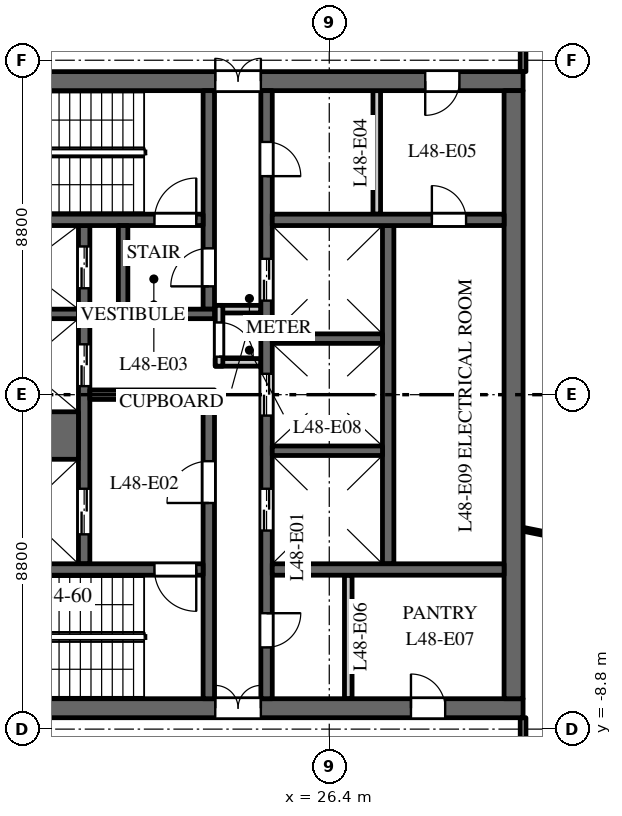
"""IFC4 building model, lengths in metres.
Left out: names, types, materials, properties, quantities, classifications, styles, units other than length and angle.
Written with IfcOpenShell. Run it as: python <this file> out.ifc"""

import sys

from ifc_helpers import new_model, si_unit, direction, frame, frame_2d, origin, place, context, subcontext, project, spatial, rectangle, extrude, element, fill, save


model = new_model("IFC4")
c1 = context("Model", 3, precision=1e-05, world=origin(), true_north=direction((0.0, 1.0)))
c2 = subcontext(c1, "Body", "Model", "MODEL_VIEW")
j1 = project(units=[si_unit("LENGTHUNIT", "METRE"), si_unit("PLANEANGLEUNIT", "RADIAN")], contexts=[c1])
p1 = place(None, origin())
s1 = spatial("IfcSite", under=j1, at=p1, CompositionType="ELEMENT")
p2 = place(p1, origin())
s2 = spatial("IfcBuilding", under=s1, at=p2, CompositionType="ELEMENT")
p3 = place(p2, frame((0.0, 0.0, 233.5)))
s3 = spatial("IfcBuildingStorey", under=s2, at=p3, CompositionType="ELEMENT", Elevation=233.5)
p4 = place(p3, frame((16.5, 8.25, 0.0), z_axis=(0.0, 0.0, 1.0), x_axis=(1.0, 0.0, 0.0)))
e1 = element("IfcWall", 1, at=p4, inside=s3, PredefinedType="SHEAR", context=c2, shape_type="SweptSolid", body=[
    extrude(rectangle(XDim=15.0, YDim=0.5, at=frame_2d((7.5, 0.0))), origin(), (0.0, 0.0, 1.0), 3.7),
])
p5 = place(p4, frame((6.9, 0.0, 0.0)))
e2 = element("IfcOpeningElement", 2, at=p5, cuts=e1, PredefinedType="OPENING", context=c2, shape_type="SweptSolid", body=[
    extrude(rectangle(XDim=1.2, YDim=2.1, at=frame_2d((0.6, 1.05))), frame((0.0, 0.26, 0.0), z_axis=(0.0, -1.0, 0.0), x_axis=(1.0, 0.0, 0.0)), (0.0, 0.0, 1.0), 0.52),
])
p6 = place(p4, frame((12.425, 0.0, 0.0)))
e3 = element("IfcOpeningElement", 3, at=p6, cuts=e1, PredefinedType="OPENING", context=c2, shape_type="SweptSolid", body=[
    extrude(rectangle(XDim=0.9, YDim=2.1, at=frame_2d((0.45, 1.05))), frame((0.0, 0.26, 0.0), z_axis=(0.0, -1.0, 0.0), x_axis=(1.0, 0.0, 0.0)), (0.0, 0.0, 1.0), 0.52),
])
p7 = place(p3, frame((16.5, -8.25, 0.0), z_axis=(0.0, 0.0, 1.0), x_axis=(1.0, 0.0, 0.0)))
e4 = element("IfcWall", 4, at=p7, inside=s3, PredefinedType="SHEAR", context=c2, shape_type="SweptSolid", body=[
    extrude(rectangle(XDim=15.0, YDim=0.5, at=frame_2d((7.5, 0.0))), origin(), (0.0, 0.0, 1.0), 3.7),
])
p8 = place(p7, frame((6.9, 0.0, 0.0)))
e5 = element("IfcOpeningElement", 5, at=p8, cuts=e4, PredefinedType="OPENING", context=c2, shape_type="SweptSolid", body=[
    extrude(rectangle(XDim=1.2, YDim=2.1, at=frame_2d((0.6, 1.05))), frame((0.0, 0.26, 0.0), z_axis=(0.0, -1.0, 0.0), x_axis=(1.0, 0.0, 0.0)), (0.0, 0.0, 1.0), 0.52),
])
p9 = place(p7, frame((12.05, 0.0, 0.0)))
e6 = element("IfcOpeningElement", 6, at=p9, cuts=e4, PredefinedType="OPENING", context=c2, shape_type="SweptSolid", body=[
    extrude(rectangle(XDim=0.9, YDim=2.1, at=frame_2d((0.45, 1.05))), frame((0.0, 0.26, 0.0), z_axis=(0.0, -1.0, 0.0), x_axis=(1.0, 0.0, 0.0)), (0.0, 0.0, 1.0), 0.52),
])
p10 = place(p3, frame((27.95, -4.45, 0.0), z_axis=(0.0, 0.0, 1.0), x_axis=(0.0, 1.0, 0.0)))
e7 = element("IfcWall", 7, at=p10, inside=s3, PredefinedType="SHEAR", context=c2, shape_type="SweptSolid", body=[
    extrude(rectangle(XDim=8.9, YDim=0.3, at=frame_2d((4.45, 0.0))), origin(), (0.0, 0.0, 1.0), 3.7),
])
p11 = place(p3, frame((19.95, -4.45, 0.0), z_axis=(0.0, 0.0, 1.0), x_axis=(0.0, 1.0, 0.0)))
e8 = element("IfcWall", 8, at=p11, inside=s3, PredefinedType="SHEAR", context=c2, shape_type="SweptSolid", body=[
    extrude(rectangle(XDim=8.9, YDim=0.3, at=frame_2d((4.45, 0.0))), origin(), (0.0, 0.0, 1.0), 3.7),
])
p12 = place(p11, frame((0.775, 0.0, 0.0)))
e9 = element("IfcOpeningElement", 9, at=p12, cuts=e8, PredefinedType="OPENING", context=c2, shape_type="SweptSolid", body=[
    extrude(rectangle(XDim=1.2, YDim=2.1, at=frame_2d((0.6, 1.05))), frame((0.0, 0.16, 0.0), z_axis=(0.0, -1.0, 0.0), x_axis=(1.0, 0.0, 0.0)), (0.0, 0.0, 1.0), 0.32),
])
p13 = place(p11, frame((4.675, 0.0, 0.0)))
e10 = element("IfcOpeningElement", 10, at=p13, cuts=e8, PredefinedType="OPENING", context=c2, shape_type="SweptSolid", body=[
    extrude(rectangle(XDim=1.1, YDim=2.1, at=frame_2d((0.55, 1.05))), frame((0.0, 0.16, 0.0), z_axis=(0.0, -1.0, 0.0), x_axis=(1.0, 0.0, 0.0)), (0.0, 0.0, 1.0), 0.32),
])
p14 = place(p11, frame((7.25, 0.0, 0.0)))
e11 = element("IfcOpeningElement", 11, at=p14, cuts=e8, PredefinedType="OPENING", context=c2, shape_type="SweptSolid", body=[
    extrude(rectangle(XDim=1.1, YDim=2.1, at=frame_2d((0.55, 1.05))), frame((0.0, 0.16, 0.0), z_axis=(0.0, -1.0, 0.0), x_axis=(1.0, 0.0, 0.0)), (0.0, 0.0, 1.0), 0.32),
])
p15 = place(p3, frame((24.75, -8.0, 0.0), z_axis=(0.0, 0.0, 1.0), x_axis=(0.0, 1.0, 0.0)))
e12 = element("IfcWall", 12, at=p15, inside=s3, PredefinedType="SHEAR", context=c2, shape_type="SweptSolid", body=[
    extrude(rectangle(XDim=16.0, YDim=0.3, at=frame_2d((8.0, 0.0))), origin(), (0.0, 0.0, 1.0), 3.7),
])
p16 = place(p15, frame((4.425, 0.0, 0.0)))
e13 = element("IfcOpeningElement", 13, at=p16, cuts=e12, PredefinedType="OPENING", context=c2, shape_type="SweptSolid", body=[
    extrude(rectangle(XDim=1.1, YDim=2.1, at=frame_2d((0.55, 1.05))), frame((0.0, 0.16, 0.0), z_axis=(0.0, -1.0, 0.0), x_axis=(1.0, 0.0, 0.0)), (0.0, 0.0, 1.0), 0.32),
])
p17 = place(p15, frame((7.45, 0.0, 0.0)))
e14 = element("IfcOpeningElement", 14, at=p17, cuts=e12, PredefinedType="OPENING", context=c2, shape_type="SweptSolid", body=[
    extrude(rectangle(XDim=1.1, YDim=2.1, at=frame_2d((0.55, 1.05))), frame((0.0, 0.16, 0.0), z_axis=(0.0, -1.0, 0.0), x_axis=(1.0, 0.0, 0.0)), (0.0, 0.0, 1.0), 0.32),
])
p18 = place(p15, frame((10.475, 0.0, 0.0)))
e15 = element("IfcOpeningElement", 15, at=p18, cuts=e12, PredefinedType="OPENING", context=c2, shape_type="SweptSolid", body=[
    extrude(rectangle(XDim=1.1, YDim=2.1, at=frame_2d((0.55, 1.05))), frame((0.0, 0.16, 0.0), z_axis=(0.0, -1.0, 0.0), x_axis=(1.0, 0.0, 0.0)), (0.0, 0.0, 1.0), 0.32),
])
p19 = place(p15, frame((13.75, 0.0, 0.0)))
e16 = element("IfcOpeningElement", 16, at=p19, cuts=e12, PredefinedType="OPENING", context=c2, shape_type="SweptSolid", body=[
    extrude(rectangle(XDim=0.9, YDim=2.1, at=frame_2d((0.45, 1.05))), frame((0.0, 0.16, 0.0), z_axis=(0.0, -1.0, 0.0), x_axis=(1.0, 0.0, 0.0)), (0.0, 0.0, 1.0), 0.32),
])
p20 = place(p15, frame((1.35, 0.0, 0.0)))
e17 = element("IfcOpeningElement", 17, at=p20, cuts=e12, PredefinedType="OPENING", context=c2, shape_type="SweptSolid", body=[
    extrude(rectangle(XDim=0.9, YDim=2.1, at=frame_2d((0.45, 1.05))), frame((0.0, 0.16, 0.0), z_axis=(0.0, -1.0, 0.0), x_axis=(1.0, 0.0, 0.0)), (0.0, 0.0, 1.0), 0.32),
])
p21 = place(p3, frame((20.1, 0.0, 0.0), z_axis=(0.0, 0.0, 1.0), x_axis=(1.0, 0.0, 0.0)))
e18 = element("IfcWall", 18, at=p21, inside=s3, PredefinedType="SHEAR", context=c2, shape_type="SweptSolid", body=[
    extrude(rectangle(XDim=3.28, YDim=0.25, at=frame_2d((1.64, 0.0))), origin(), (0.0, 0.0, 1.0), 3.7),
])
for number, where, z_axis, x_axis in (
    (19, (23.4, 0.85, 0.0), (0.0, 0.0, 1.0), (1.0, 0.0, 0.0)),
    (20, (23.4, 2.25, 0.0), (0.0, 0.0, 1.0), (1.0, 0.0, 0.0)),
):
    element("IfcWall", number, at=place(p3, frame(where, z_axis=z_axis, x_axis=x_axis)), inside=s3, PredefinedType="PARTITIONING", context=c2, shape_type="SweptSolid", body=[
        extrude(rectangle(XDim=1.2, YDim=0.2, at=frame_2d((0.6, 0.0))), origin(), (0.0, 0.0, 1.0), 3.7),
    ])
p22 = place(p3, frame((23.5, 0.75, 0.0), z_axis=(0.0, 0.0, 1.0), x_axis=(0.0, 1.0, 0.0)))
e21 = element("IfcWall", 21, at=p22, inside=s3, PredefinedType="PARTITIONING", context=c2, shape_type="SweptSolid", body=[
    extrude(rectangle(XDim=1.6, YDim=0.2, at=frame_2d((0.8, 0.0))), origin(), (0.0, 0.0, 1.0), 3.7),
])
p23 = place(p22, frame((0.25, 0.0, 0.0)))
e22 = element("IfcOpeningElement", 22, at=p23, cuts=e21, PredefinedType="OPENING", context=c2, shape_type="SweptSolid", body=[
    extrude(rectangle(XDim=0.9, YDim=2.1, at=frame_2d((0.45, 1.05))), frame((0.0, 0.11, 0.0), z_axis=(0.0, -1.0, 0.0), x_axis=(1.0, 0.0, 0.0)), (0.0, 0.0, 1.0), 0.22),
])
p24 = place(p3, frame((31.25, -8.0, 0.0), z_axis=(0.0, 0.0, 1.0), x_axis=(0.0, 1.0, 0.0)))
e23 = element("IfcWall", 23, at=p24, inside=s3, PredefinedType="SHEAR", context=c2, shape_type="SweptSolid", body=[
    extrude(rectangle(XDim=16.0, YDim=0.5, at=frame_2d((8.0, 0.0))), origin(), (0.0, 0.0, 1.0), 3.7),
])
p25 = place(p3, frame((24.9, 4.6, 0.0), z_axis=(0.0, 0.0, 1.0), x_axis=(1.0, 0.0, 0.0)))
e24 = element("IfcWall", 24, at=p25, inside=s3, PredefinedType="SHEAR", context=c2, shape_type="SweptSolid", body=[
    extrude(rectangle(XDim=6.1, YDim=0.3, at=frame_2d((3.05, 0.0))), origin(), (0.0, 0.0, 1.0), 3.7),
])
p26 = place(p25, frame((4.2, 0.0, 0.0)))
e25 = element("IfcOpeningElement", 25, at=p26, cuts=e24, PredefinedType="OPENING", context=c2, shape_type="SweptSolid", body=[
    extrude(rectangle(XDim=0.9, YDim=2.1, at=frame_2d((0.45, 1.05))), frame((0.0, 0.16, 0.0), z_axis=(0.0, -1.0, 0.0), x_axis=(1.0, 0.0, 0.0)), (0.0, 0.0, 1.0), 0.32),
])
for number, where, z_axis, x_axis in (
    (26, (27.65, 4.75, 0.0), (0.0, 0.0, 1.0), (0.0, 1.0, 0.0)),
    (27, (26.9, -8.0, 0.0), (0.0, 0.0, 1.0), (0.0, 1.0, 0.0)),
):
    element("IfcWall", number, at=place(p3, frame(where, z_axis=z_axis, x_axis=x_axis)), inside=s3, PredefinedType="PARTITIONING", context=c2, shape_type="SweptSolid", body=[
        extrude(rectangle(XDim=3.25, YDim=0.2, at=frame_2d((1.625, 0.0))), origin(), (0.0, 0.0, 1.0), 3.7),
    ])
p27 = place(p3, frame((24.9, -4.6, 0.0), z_axis=(0.0, 0.0, 1.0), x_axis=(1.0, 0.0, 0.0)))
e28 = element("IfcWall", 28, at=p27, inside=s3, PredefinedType="SHEAR", context=c2, shape_type="SweptSolid", body=[
    extrude(rectangle(XDim=6.1, YDim=0.3, at=frame_2d((3.05, 0.0))), origin(), (0.0, 0.0, 1.0), 3.7),
])
p28 = place(p3, frame((16.9, -1.075, 0.0), z_axis=(0.0, 0.0, 1.0), x_axis=(1.0, 0.0, 0.0)))
e29 = element("IfcWall", 29, at=p28, inside=s3, PredefinedType="SHEAR", context=c2, shape_type="SweptSolid", body=[
    extrude(rectangle(XDim=2.9, YDim=1.25, at=frame_2d((1.45, 0.0))), origin(), (0.0, 0.0, 1.0), 3.7),
])
for number, where, z_axis, x_axis in (
    (30, (16.9, 2.125, 0.0), (0.0, 0.0, 1.0), (1.0, 0.0, 0.0)),
    (31, (24.9, -1.475, 0.0), (0.0, 0.0, 1.0), (1.0, 0.0, 0.0)),
    (32, (24.9, 1.475, 0.0), (0.0, 0.0, 1.0), (1.0, 0.0, 0.0)),
):
    element("IfcWall", number, at=place(p3, frame(where, z_axis=z_axis, x_axis=x_axis)), inside=s3, PredefinedType="SHEAR", context=c2, shape_type="SweptSolid", body=[
        extrude(rectangle(XDim=2.9, YDim=0.25, at=frame_2d((1.45, 0.0))), origin(), (0.0, 0.0, 1.0), 3.7),
    ])
p29 = place(p3, frame((23.23, 2.25, 0.0), z_axis=(0.0, 0.0, 1.0), x_axis=(0.0, 1.0, 0.0)))
e33 = element("IfcWall", 33, at=p29, inside=s3, PredefinedType="SHEAR", context=c2, shape_type="SweptSolid", body=[
    extrude(rectangle(XDim=5.75, YDim=0.3, at=frame_2d((2.875, 0.0))), origin(), (0.0, 0.0, 1.0), 3.7),
])
p30 = place(p29, frame((0.6, 0.0, 0.0)))
e34 = element("IfcOpeningElement", 34, at=p30, cuts=e33, PredefinedType="OPENING", context=c2, shape_type="SweptSolid", body=[
    extrude(rectangle(XDim=1.0, YDim=2.1, at=frame_2d((0.5, 1.05))), frame((0.0, 0.16, 0.0), z_axis=(0.0, -1.0, 0.0), x_axis=(1.0, 0.0, 0.0)), (0.0, 0.0, 1.0), 0.32),
])
p31 = place(p3, frame((23.23, -8.0, 0.0), z_axis=(0.0, 0.0, 1.0), x_axis=(0.0, 1.0, 0.0)))
e35 = element("IfcWall", 35, at=p31, inside=s3, PredefinedType="SHEAR", context=c2, shape_type="SweptSolid", body=[
    extrude(rectangle(XDim=7.875, YDim=0.3, at=frame_2d((3.938, 0.0))), origin(), (0.0, 0.0, 1.0), 3.7),
])
p32 = place(p31, frame((5.15, 0.0, 0.0)))
e36 = element("IfcOpeningElement", 36, at=p32, cuts=e35, PredefinedType="OPENING", context=c2, shape_type="SweptSolid", body=[
    extrude(rectangle(XDim=1.1, YDim=2.1, at=frame_2d((0.55, 1.05))), frame((0.0, 0.16, 0.0), z_axis=(0.0, -1.0, 0.0), x_axis=(1.0, 0.0, 0.0)), (0.0, 0.0, 1.0), 0.32),
])
p33 = place(p3, frame((16.9, 4.6, 0.0), z_axis=(0.0, 0.0, 1.0), x_axis=(1.0, 0.0, 0.0)))
e37 = element("IfcWall", 37, at=p33, inside=s3, PredefinedType="SHEAR", context=c2, shape_type="SweptSolid", body=[
    extrude(rectangle(XDim=6.18, YDim=0.3, at=frame_2d((3.09, 0.0))), origin(), (0.0, 0.0, 1.0), 3.7),
])
p34 = place(p33, frame((4.9, 0.0, 0.0)))
e38 = element("IfcOpeningElement", 38, at=p34, cuts=e37, PredefinedType="OPENING", context=c2, shape_type="SweptSolid", body=[
    extrude(rectangle(XDim=1.1, YDim=2.1, at=frame_2d((0.55, 1.05))), frame((0.0, 0.16, 0.0), z_axis=(0.0, -1.0, 0.0), x_axis=(1.0, 0.0, 0.0)), (0.0, 0.0, 1.0), 0.32),
])
p35 = place(p3, frame((16.9, -4.6, 0.0), z_axis=(0.0, 0.0, 1.0), x_axis=(1.0, 0.0, 0.0)))
e39 = element("IfcWall", 39, at=p35, inside=s3, PredefinedType="SHEAR", context=c2, shape_type="SweptSolid", body=[
    extrude(rectangle(XDim=6.18, YDim=0.3, at=frame_2d((3.09, 0.0))), origin(), (0.0, 0.0, 1.0), 3.7),
])
p36 = place(p35, frame((4.9, 0.0, 0.0)))
e40 = element("IfcOpeningElement", 40, at=p36, cuts=e39, PredefinedType="OPENING", context=c2, shape_type="SweptSolid", body=[
    extrude(rectangle(XDim=1.1, YDim=2.1, at=frame_2d((0.55, 1.05))), frame((0.0, 0.16, 0.0), z_axis=(0.0, -1.0, 0.0), x_axis=(1.0, 0.0, 0.0)), (0.0, 0.0, 1.0), 0.32),
])
p37 = place(p3, frame((20.85, 2.125, 0.0), z_axis=(0.0, 0.0, 1.0), x_axis=(1.0, 0.0, 0.0)))
e41 = element("IfcWall", 41, at=p37, inside=s3, PredefinedType="SHEAR", context=c2, shape_type="SweptSolid", body=[
    extrude(rectangle(XDim=2.53, YDim=0.25, at=frame_2d((1.265, 0.0))), origin(), (0.0, 0.0, 1.0), 3.7),
])
p38 = place(p3, frame((20.975, 2.25, 0.0), z_axis=(0.0, 0.0, 1.0), x_axis=(0.0, 1.0, 0.0)))
e42 = element("IfcWall", 42, at=p38, inside=s3, PredefinedType="SHEAR", context=c2, shape_type="SweptSolid", body=[
    extrude(rectangle(XDim=2.2, YDim=0.25, at=frame_2d((1.1, 0.0))), origin(), (0.0, 0.0, 1.0), 3.7),
])
p39 = place(p3, frame((31.5, -10.7, 0.0), z_axis=(0.0, 0.0, 1.0), x_axis=(0.0, 1.0, 0.0)))
e43 = element("IfcWall", 43, at=p39, inside=s3, PredefinedType="PARTITIONING", context=c2, shape_type="SweptSolid", body=[
    extrude(rectangle(XDim=2.2, YDim=0.15, at=frame_2d((1.1, 0.0))), origin(), (0.0, 0.0, 1.0), 3.0),
])
p40 = place(p39, frame((0.65, 0.0, 0.0)))
e44 = element("IfcOpeningElement", 44, at=p40, cuts=e43, PredefinedType="OPENING", context=c2, shape_type="SweptSolid", body=[
    extrude(rectangle(XDim=1.0, YDim=2.1, at=frame_2d((0.5, 1.05))), frame((0.0, 0.085, 0.0), z_axis=(0.0, -1.0, 0.0), x_axis=(1.0, 0.0, 0.0)), (0.0, 0.0, 1.0), 0.17),
])
p41 = place(p3, frame((31.5, -3.542, 0.0), z_axis=(0.0, 0.0, 1.0), x_axis=(0.980357474535, -0.197228857227, 0.0)))
e45 = element("IfcWall", 45, at=p41, inside=s3, PredefinedType="PARTITIONING", context=c2, shape_type="SweptSolid", body=[
    extrude(rectangle(XDim=4.092, YDim=0.1, at=frame_2d((2.046, 0.0))), origin(), (0.0, 0.0, 1.0), 3.0),
])
p42 = place(p3, frame((31.5, 8.5, 0.0), z_axis=(0.0, 0.0, 1.0), x_axis=(0.0, 1.0, 0.0)))
e46 = element("IfcWall", 46, at=p42, inside=s3, PredefinedType="PARTITIONING", context=c2, shape_type="SweptSolid", body=[
    extrude(rectangle(XDim=2.2, YDim=0.15, at=frame_2d((1.1, 0.0))), origin(), (0.0, 0.0, 1.0), 3.0),
])
p43 = place(p42, frame((0.65, 0.0, 0.0)))
e47 = element("IfcOpeningElement", 47, at=p43, cuts=e46, PredefinedType="OPENING", context=c2, shape_type="SweptSolid", body=[
    extrude(rectangle(XDim=1.0, YDim=2.1, at=frame_2d((0.5, 1.05))), frame((0.0, 0.085, 0.0), z_axis=(0.0, -1.0, 0.0), x_axis=(1.0, 0.0, 0.0)), (0.0, 0.0, 1.0), 0.17),
])
p44 = place(p12, origin())
e48 = element("IfcDoor", 48, at=p44, inside=s3, OperationType="DOUBLE_DOOR_SLIDING", PredefinedType="DOOR", context=c2, shape_type="SweptSolid", body=[
    extrude(rectangle(XDim=1.2, YDim=2.1, at=frame_2d((0.6, 1.05))), frame((0.0, 0.025, 0.0), z_axis=(0.0, -1.0, 0.0), x_axis=(1.0, 0.0, 0.0)), (0.0, 0.0, 1.0), 0.05),
])
fill(e9, e48)
p45 = place(p13, origin())
e49 = element("IfcDoor", 49, at=p45, inside=s3, OperationType="DOUBLE_DOOR_SLIDING", PredefinedType="DOOR", context=c2, shape_type="SweptSolid", body=[
    extrude(rectangle(XDim=1.1, YDim=2.1, at=frame_2d((0.55, 1.05))), frame((0.0, 0.025, 0.0), z_axis=(0.0, -1.0, 0.0), x_axis=(1.0, 0.0, 0.0)), (0.0, 0.0, 1.0), 0.05),
])
fill(e10, e49)
p46 = place(p14, origin())
e50 = element("IfcDoor", 50, at=p46, inside=s3, OperationType="DOUBLE_DOOR_SLIDING", PredefinedType="DOOR", context=c2, shape_type="SweptSolid", body=[
    extrude(rectangle(XDim=1.1, YDim=2.1, at=frame_2d((0.55, 1.05))), frame((0.0, 0.025, 0.0), z_axis=(0.0, -1.0, 0.0), x_axis=(1.0, 0.0, 0.0)), (0.0, 0.0, 1.0), 0.05),
])
fill(e11, e50)
p47 = place(p16, origin())
e51 = element("IfcDoor", 51, at=p47, inside=s3, OperationType="DOUBLE_DOOR_SLIDING", PredefinedType="DOOR", context=c2, shape_type="SweptSolid", body=[
    extrude(rectangle(XDim=1.1, YDim=2.1, at=frame_2d((0.55, 1.05))), frame((0.0, 0.025, 0.0), z_axis=(0.0, -1.0, 0.0), x_axis=(1.0, 0.0, 0.0)), (0.0, 0.0, 1.0), 0.05),
])
fill(e13, e51)
p48 = place(p17, origin())
e52 = element("IfcDoor", 52, at=p48, inside=s3, OperationType="DOUBLE_DOOR_SLIDING", PredefinedType="DOOR", context=c2, shape_type="SweptSolid", body=[
    extrude(rectangle(XDim=1.1, YDim=2.1, at=frame_2d((0.55, 1.05))), frame((0.0, 0.025, 0.0), z_axis=(0.0, -1.0, 0.0), x_axis=(1.0, 0.0, 0.0)), (0.0, 0.0, 1.0), 0.05),
])
fill(e14, e52)
p49 = place(p18, origin())
e53 = element("IfcDoor", 53, at=p49, inside=s3, OperationType="DOUBLE_DOOR_SLIDING", PredefinedType="DOOR", context=c2, shape_type="SweptSolid", body=[
    extrude(rectangle(XDim=1.1, YDim=2.1, at=frame_2d((0.55, 1.05))), frame((0.0, 0.025, 0.0), z_axis=(0.0, -1.0, 0.0), x_axis=(1.0, 0.0, 0.0)), (0.0, 0.0, 1.0), 0.05),
])
fill(e15, e53)
p50 = place(p34, origin())
e54 = element("IfcDoor", 54, at=p50, inside=s3, OperationType="SINGLE_SWING_LEFT", PredefinedType="DOOR", context=c2, shape_type="SweptSolid", body=[
    extrude(rectangle(XDim=1.1, YDim=2.1, at=frame_2d((0.55, 1.05))), frame((0.0, 0.025, 0.0), z_axis=(0.0, -1.0, 0.0), x_axis=(1.0, 0.0, 0.0)), (0.0, 0.0, 1.0), 0.05),
])
fill(e38, e54)
p51 = place(p36, origin())
e55 = element("IfcDoor", 55, at=p51, inside=s3, OperationType="SINGLE_SWING_RIGHT", PredefinedType="DOOR", context=c2, shape_type="SweptSolid", body=[
    extrude(rectangle(XDim=1.1, YDim=2.1, at=frame_2d((0.55, 1.05))), frame((0.0, 0.025, 0.0), z_axis=(0.0, -1.0, 0.0), x_axis=(1.0, 0.0, 0.0)), (0.0, 0.0, 1.0), 0.05),
])
fill(e40, e55)
p52 = place(p32, origin())
e56 = element("IfcDoor", 56, at=p52, inside=s3, OperationType="SINGLE_SWING_RIGHT", PredefinedType="DOOR", context=c2, shape_type="SweptSolid", body=[
    extrude(rectangle(XDim=1.1, YDim=2.1, at=frame_2d((0.55, 1.05))), frame((0.0, 0.025, 0.0), z_axis=(0.0, -1.0, 0.0), x_axis=(1.0, 0.0, 0.0)), (0.0, 0.0, 1.0), 0.05),
])
fill(e36, e56)
p53 = place(p30, origin())
e57 = element("IfcDoor", 57, at=p53, inside=s3, OperationType="SINGLE_SWING_RIGHT", PredefinedType="DOOR", context=c2, shape_type="SweptSolid", body=[
    extrude(rectangle(XDim=1.0, YDim=2.1, at=frame_2d((0.5, 1.05))), frame((0.0, 0.025, 0.0), z_axis=(0.0, -1.0, 0.0), x_axis=(1.0, 0.0, 0.0)), (0.0, 0.0, 1.0), 0.05),
])
fill(e34, e57)
p54 = place(p5, origin())
e58 = element("IfcDoor", 58, at=p54, inside=s3, OperationType="DOUBLE_DOOR_DOUBLE_SWING", PredefinedType="DOOR", context=c2, shape_type="SweptSolid", body=[
    extrude(rectangle(XDim=1.2, YDim=2.1, at=frame_2d((0.6, 1.05))), frame((0.0, 0.025, 0.0), z_axis=(0.0, -1.0, 0.0), x_axis=(1.0, 0.0, 0.0)), (0.0, 0.0, 1.0), 0.05),
])
fill(e2, e58)
p55 = place(p8, origin())
e59 = element("IfcDoor", 59, at=p55, inside=s3, OperationType="DOUBLE_DOOR_DOUBLE_SWING", PredefinedType="DOOR", context=c2, shape_type="SweptSolid", body=[
    extrude(rectangle(XDim=1.2, YDim=2.1, at=frame_2d((0.6, 1.05))), frame((0.0, 0.025, 0.0), z_axis=(0.0, -1.0, 0.0), x_axis=(1.0, 0.0, 0.0)), (0.0, 0.0, 1.0), 0.05),
])
fill(e5, e59)
p56 = place(p19, origin())
e60 = element("IfcDoor", 60, at=p56, inside=s3, OperationType="SINGLE_SWING_LEFT", PredefinedType="DOOR", context=c2, shape_type="SweptSolid", body=[
    extrude(rectangle(XDim=0.9, YDim=2.1, at=frame_2d((0.45, 1.05))), frame((0.0, 0.025, 0.0), z_axis=(0.0, -1.0, 0.0), x_axis=(1.0, 0.0, 0.0)), (0.0, 0.0, 1.0), 0.05),
])
fill(e16, e60)
p57 = place(p6, origin())
e61 = element("IfcDoor", 61, at=p57, inside=s3, OperationType="SINGLE_SWING_LEFT", PredefinedType="DOOR", context=c2, shape_type="SweptSolid", body=[
    extrude(rectangle(XDim=0.9, YDim=2.1, at=frame_2d((0.45, 1.05))), frame((0.0, 0.025, 0.0), z_axis=(0.0, -1.0, 0.0), x_axis=(1.0, 0.0, 0.0)), (0.0, 0.0, 1.0), 0.05),
])
fill(e3, e61)
p58 = place(p20, origin())
e62 = element("IfcDoor", 62, at=p58, inside=s3, OperationType="SINGLE_SWING_RIGHT", PredefinedType="DOOR", context=c2, shape_type="SweptSolid", body=[
    extrude(rectangle(XDim=0.9, YDim=2.1, at=frame_2d((0.45, 1.05))), frame((0.0, 0.025, 0.0), z_axis=(0.0, -1.0, 0.0), x_axis=(1.0, 0.0, 0.0)), (0.0, 0.0, 1.0), 0.05),
])
fill(e17, e62)
p59 = place(p9, origin())
e63 = element("IfcDoor", 63, at=p59, inside=s3, OperationType="SINGLE_SWING_RIGHT", PredefinedType="DOOR", context=c2, shape_type="SweptSolid", body=[
    extrude(rectangle(XDim=0.9, YDim=2.1, at=frame_2d((0.45, 1.05))), frame((0.0, 0.025, 0.0), z_axis=(0.0, -1.0, 0.0), x_axis=(1.0, 0.0, 0.0)), (0.0, 0.0, 1.0), 0.05),
])
fill(e6, e63)
p60 = place(p23, origin())
e64 = element("IfcDoor", 64, at=p60, inside=s3, OperationType="SINGLE_SWING_LEFT", PredefinedType="DOOR", context=c2, shape_type="SweptSolid", body=[
    extrude(rectangle(XDim=0.9, YDim=2.1, at=frame_2d((0.45, 1.05))), frame((0.0, 0.025, 0.0), z_axis=(0.0, -1.0, 0.0), x_axis=(1.0, 0.0, 0.0)), (0.0, 0.0, 1.0), 0.05),
])
fill(e22, e64)
p61 = place(p26, origin())
e65 = element("IfcDoor", 65, at=p61, inside=s3, OperationType="SINGLE_SWING_RIGHT", PredefinedType="DOOR", context=c2, shape_type="SweptSolid", body=[
    extrude(rectangle(XDim=0.9, YDim=2.1, at=frame_2d((0.45, 1.05))), frame((0.0, 0.025, 0.0), z_axis=(0.0, -1.0, 0.0), x_axis=(1.0, 0.0, 0.0)), (0.0, 0.0, 1.0), 0.05),
])
fill(e25, e65)
save(model, sys.argv[1])
